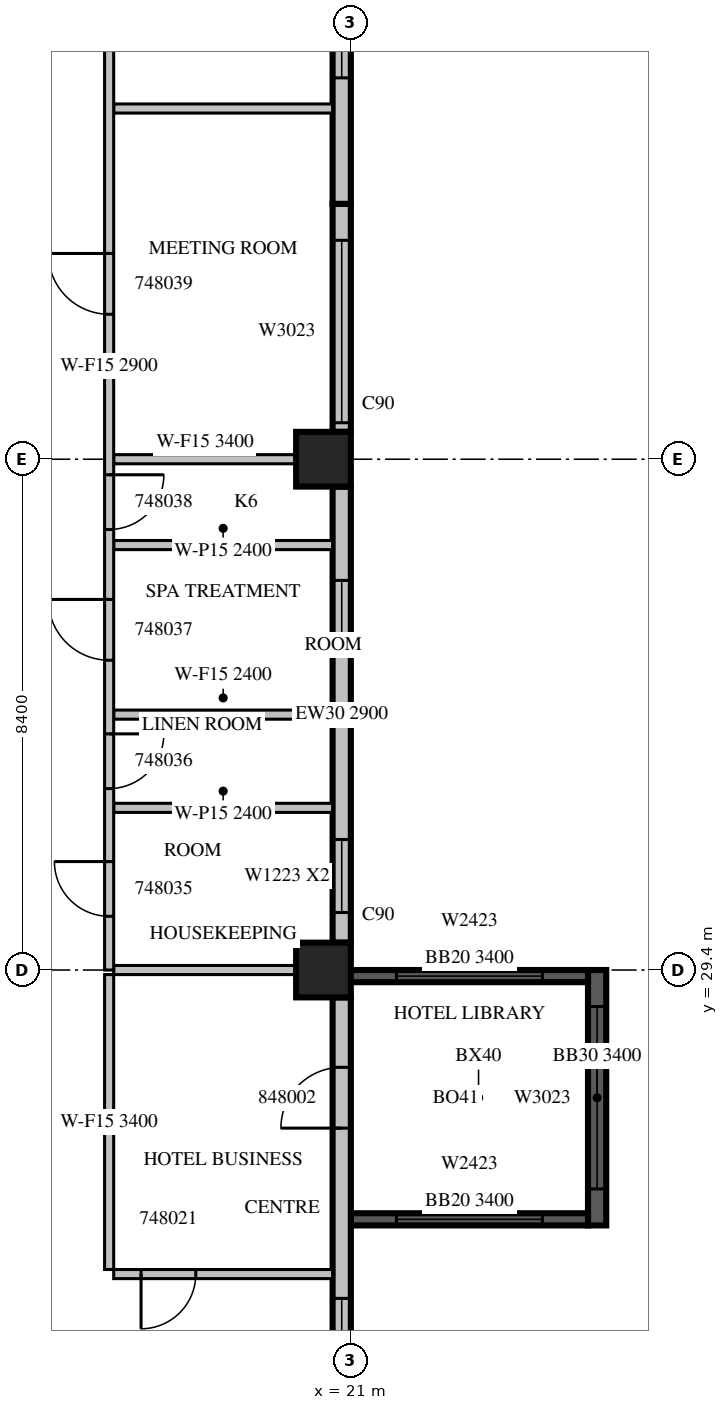
"""IFC4 building model, lengths in metres.
Left out: names, types, materials, properties, quantities, classifications, styles, units other than length and angle.
Written with IfcOpenShell. Run it as: python <this file> out.ifc"""

import sys

from ifc_helpers import new_model, si_unit, direction, frame, frame_2d, origin, origin_2d, place, context, subcontext, project, spatial, rectangle, extrude, source, transform, mapped, element, fill, save


model = new_model("IFC4")
c1 = context("Model", 3, precision=1e-05, world=origin(), true_north=direction((0.0, 1.0)))
c2 = subcontext(c1, "Body", "Model", "MODEL_VIEW")
j1 = project(units=[si_unit("LENGTHUNIT", "METRE"), si_unit("PLANEANGLEUNIT", "RADIAN")], contexts=[c1])
p1 = place(None, origin())
s1 = spatial("IfcSite", under=j1, at=p1, CompositionType="ELEMENT")
p2 = place(p1, origin())
s2 = spatial("IfcBuilding", under=s1, at=p2, CompositionType="ELEMENT")
p3 = place(p2, frame((0.0, 0.0, 215.8)))
s3 = spatial("IfcBuildingStorey", under=s2, at=p3, CompositionType="ELEMENT", Elevation=215.8)
m1 = source(origin(), c2, "Body", "SweptSolid", [
    extrude(rectangle(XDim=0.9, YDim=0.9, at=origin_2d()), origin(), (0.0, 0.0, 1.0), 3.8),
])
for number, where, z_axis, x_axis in (
    (1, (20.55, 29.4, 0.0), (0.0, 0.0, 1.0), (1.0, 0.0, 0.0)),
    (2, (20.55, 37.8, 0.0), (0.0, 0.0, 1.0), (1.0, 0.0, 0.0)),
):
    element("IfcColumn", number, at=place(p3, frame(where, z_axis=z_axis, x_axis=x_axis)), inside=s3, PredefinedType="COLUMN", context=c2, shape_type="MappedRepresentation", body=[
        mapped(m1, transform((0.0, 0.0, 0.0), scale=1.0)),
    ])
m2 = source(origin(), c2, "Body", "SweptSolid", [
    extrude(rectangle(XDim=4.2, YDim=0.3, at=frame_2d((2.1, 0.0))), origin(), (0.0, 0.0, 1.0), 3.4),
])
p4 = place(p3, frame((25.05, 25.2, 0.0), z_axis=(0.0, 0.0, 1.0), x_axis=(0.0, 1.0, 0.0)))
e3 = element("IfcWall", 3, at=p4, inside=s3, PredefinedType="SOLIDWALL", context=c2, shape_type="MappedRepresentation", body=[
    mapped(m2, transform((0.0, 0.0, 0.0), scale=1.0)),
])
m3 = source(origin(), c2, "Body", "SweptSolid", [
    extrude(rectangle(XDim=3.0, YDim=2.3, at=frame_2d((1.5, 1.15))), frame((0.0, 0.16, 0.0), z_axis=(0.0, -1.0, 0.0), x_axis=(1.0, 0.0, 0.0)), (0.0, 0.0, 1.0), 0.32),
])
p5 = place(p4, frame((0.6, 0.0, 0.6)))
e4 = element("IfcOpeningElement", 4, at=p5, cuts=e3, PredefinedType="OPENING", context=c2, shape_type="MappedRepresentation", body=[
    mapped(m3, transform((0.0, 0.0, 0.0), scale=1.0)),
])
m4 = source(origin(), c2, "Body", "SweptSolid", [
    extrude(rectangle(XDim=3.9, YDim=0.2, at=frame_2d((1.95, 0.0))), origin(), (0.0, 0.0, 1.0), 3.4),
])
p6 = place(p3, frame((21.0, 25.3, 0.0), z_axis=(0.0, 0.0, 1.0), x_axis=(1.0, 0.0, 0.0)))
e5 = element("IfcWall", 5, at=p6, inside=s3, PredefinedType="SOLIDWALL", context=c2, shape_type="MappedRepresentation", body=[
    mapped(m4, transform((0.0, 0.0, 0.0), scale=1.0)),
])
m5 = source(origin(), c2, "Body", "SweptSolid", [
    extrude(rectangle(XDim=2.4, YDim=2.3, at=frame_2d((1.2, 1.15))), frame((0.0, 0.11, 0.0), z_axis=(0.0, -1.0, 0.0), x_axis=(1.0, 0.0, 0.0)), (0.0, 0.0, 1.0), 0.22),
])
p7 = place(p6, frame((0.75, 0.0, 0.6)))
e6 = element("IfcOpeningElement", 6, at=p7, cuts=e5, PredefinedType="OPENING", context=c2, shape_type="MappedRepresentation", body=[
    mapped(m5, transform((0.0, 0.0, 0.0), scale=1.0)),
])
p8 = place(p3, frame((21.0, 29.3, 0.0), z_axis=(0.0, 0.0, 1.0), x_axis=(1.0, 0.0, 0.0)))
e7 = element("IfcWall", 7, at=p8, inside=s3, PredefinedType="SOLIDWALL", context=c2, shape_type="MappedRepresentation", body=[
    mapped(m4, transform((0.0, 0.0, 0.0), scale=1.0)),
])
p9 = place(p8, frame((0.75, 0.0, 0.6)))
e8 = element("IfcOpeningElement", 8, at=p9, cuts=e7, PredefinedType="OPENING", context=c2, shape_type="MappedRepresentation", body=[
    mapped(m5, transform((0.0, 0.0, 0.0), scale=1.0)),
])
m6 = source(origin(), c2, "Body", "SweptSolid", [
    extrude(rectangle(XDim=7.15, YDim=0.3, at=frame_2d((3.575, 0.0))), origin(), (0.0, 0.0, 1.0), 3.4),
])
p10 = place(p3, frame((20.85, 21.8, 0.0), z_axis=(0.0, 0.0, 1.0), x_axis=(0.0, 1.0, 0.0)))
e9 = element("IfcWall", 9, at=p10, inside=s3, PredefinedType="STANDARD", context=c2, shape_type="MappedRepresentation", body=[
    mapped(m6, transform((0.0, 0.0, 0.0), scale=1.0)),
])
m7 = source(origin(), c2, "Body", "SweptSolid", [
    extrude(rectangle(XDim=1.8, YDim=2.3, at=frame_2d((0.9, 1.15))), frame((0.0, 0.16, 0.0), z_axis=(0.0, -1.0, 0.0), x_axis=(1.0, 0.0, 0.0)), (0.0, 0.0, 1.0), 0.32),
])
p11 = place(p10, frame((0.4, 0.0, 0.6)))
e10 = element("IfcOpeningElement", 10, at=p11, cuts=e9, PredefinedType="OPENING", context=c2, shape_type="MappedRepresentation", body=[
    mapped(m7, transform((0.0, 0.0, 0.0), scale=1.0)),
])
m8 = source(origin(), c2, "Body", "SweptSolid", [
    extrude(rectangle(XDim=1.0, YDim=2.1, at=frame_2d((0.5, 1.05))), frame((0.0, 0.16, 0.0), z_axis=(0.0, -1.0, 0.0), x_axis=(1.0, 0.0, 0.0)), (0.0, 0.0, 1.0), 0.32),
])
p12 = place(p10, frame((5.0, 0.0, 0.0)))
e11 = element("IfcOpeningElement", 11, at=p12, cuts=e9, PredefinedType="OPENING", context=c2, shape_type="MappedRepresentation", body=[
    mapped(m8, transform((0.0, 0.0, 0.0), scale=1.0)),
])
m9 = source(origin(), c2, "Body", "SweptSolid", [
    extrude(rectangle(XDim=7.5, YDim=0.3, at=frame_2d((3.75, 0.0))), origin(), (0.0, 0.0, 1.0), 2.9),
])
p13 = place(p3, frame((20.85, 29.85, 0.0), z_axis=(0.0, 0.0, 1.0), x_axis=(0.0, 1.0, 0.0)))
e12 = element("IfcWall", 12, at=p13, inside=s3, PredefinedType="STANDARD", context=c2, shape_type="MappedRepresentation", body=[
    mapped(m9, transform((0.0, 0.0, 0.0), scale=1.0)),
])
m10 = source(origin(), c2, "Body", "SweptSolid", [
    extrude(rectangle(XDim=1.2, YDim=2.3, at=frame_2d((0.6, 1.15))), frame((0.0, 0.16, 0.0), z_axis=(0.0, -1.0, 0.0), x_axis=(1.0, 0.0, 0.0)), (0.0, 0.0, 1.0), 0.32),
])
p14 = place(p13, frame((0.496, 0.0, 0.6)))
e13 = element("IfcOpeningElement", 13, at=p14, cuts=e12, PredefinedType="OPENING", context=c2, shape_type="MappedRepresentation", body=[
    mapped(m10, transform((0.0, 0.0, 0.0), scale=1.0)),
])
p15 = place(p13, frame((4.757, 0.0, 0.6)))
e14 = element("IfcOpeningElement", 14, at=p15, cuts=e12, PredefinedType="OPENING", context=c2, shape_type="MappedRepresentation", body=[
    mapped(m10, transform((0.0, 0.0, 0.0), scale=1.0)),
])
m11 = source(origin(), c2, "Body", "SweptSolid", [
    extrude(rectangle(XDim=3.75, YDim=0.3, at=frame_2d((1.875, 0.0))), origin(), (0.0, 0.0, 1.0), 3.4),
])
p16 = place(p3, frame((20.85, 38.25, 0.0), z_axis=(0.0, 0.0, 1.0), x_axis=(0.0, 1.0, 0.0)))
e15 = element("IfcWall", 15, at=p16, inside=s3, PredefinedType="STANDARD", context=c2, shape_type="MappedRepresentation", body=[
    mapped(m11, transform((0.0, 0.0, 0.0), scale=1.0)),
])
p17 = place(p16, frame((0.15, 0.0, 0.6)))
e16 = element("IfcOpeningElement", 16, at=p17, cuts=e15, PredefinedType="OPENING", context=c2, shape_type="MappedRepresentation", body=[
    mapped(m3, transform((0.0, 0.0, 0.0), scale=1.0)),
])
p18 = place(p3, frame((20.85, 42.0, 0.0), z_axis=(0.0, 0.0, 1.0), x_axis=(0.0, 1.0, 0.0)))
e17 = element("IfcWall", 17, at=p18, inside=s3, PredefinedType="STANDARD", context=c2, shape_type="MappedRepresentation", body=[
    mapped(m11, transform((0.0, 0.0, 0.0), scale=1.0)),
])
p19 = place(p18, frame((2.071, 0.0, 0.6)))
e18 = element("IfcOpeningElement", 18, at=p19, cuts=e17, PredefinedType="OPENING", context=c2, shape_type="MappedRepresentation", body=[
    mapped(m10, transform((0.0, 0.0, 0.0), scale=1.0)),
])
m12 = source(origin(), c2, "Body", "SweptSolid", [
    extrude(rectangle(XDim=3.6, YDim=0.15, at=frame_2d((1.8, 0.0))), origin(), (0.0, 0.0, 1.0), 3.4),
])
p20 = place(p3, frame((17.1, 24.4, 0.0), z_axis=(0.0, 0.0, 1.0), x_axis=(1.0, 0.0, 0.0)))
e19 = element("IfcWall", 19, at=p20, inside=s3, PredefinedType="PARTITIONING", context=c2, shape_type="MappedRepresentation", body=[
    mapped(m12, transform((0.0, 0.0, 0.0), scale=1.0)),
])
m13 = source(origin(), c2, "Body", "SweptSolid", [
    extrude(rectangle(XDim=0.9, YDim=2.1, at=frame_2d((0.45, 1.05))), frame((0.0, 0.085, 0.0), z_axis=(0.0, -1.0, 0.0), x_axis=(1.0, 0.0, 0.0)), (0.0, 0.0, 1.0), 0.17),
])
p21 = place(p20, frame((0.45, 0.0, 0.0)))
e20 = element("IfcOpeningElement", 20, at=p21, cuts=e19, PredefinedType="OPENING", context=c2, shape_type="MappedRepresentation", body=[
    mapped(m13, transform((0.0, 0.0, 0.0), scale=1.0)),
])
m14 = source(origin(), c2, "Body", "SweptSolid", [
    extrude(rectangle(XDim=4.85, YDim=0.15, at=frame_2d((2.425, 0.0))), origin(), (0.0, 0.0, 1.0), 3.4),
])
p22 = place(p3, frame((17.025, 29.325, 0.0), z_axis=(0.0, 0.0, 1.0), x_axis=(0.0, -1.0, 0.0)))
e21 = element("IfcWall", 21, at=p22, inside=s3, PredefinedType="PARTITIONING", context=c2, shape_type="MappedRepresentation", body=[
    mapped(m14, transform((0.0, 0.0, 0.0), scale=1.0)),
])
m15 = source(origin(), c2, "Body", "SweptSolid", [
    extrude(rectangle(XDim=3.001, YDim=0.15, at=frame_2d((1.5, 0.0))), origin(), (0.0, 0.0, 1.0), 3.4),
])
p23 = place(p3, frame((20.101, 29.4, 0.0), z_axis=(0.0, 0.0, 1.0), x_axis=(-1.0, 0.0, 0.0)))
e22 = element("IfcWall", 22, at=p23, inside=s3, PredefinedType="PARTITIONING", context=c2, shape_type="MappedRepresentation", body=[
    mapped(m15, transform((0.0, 0.0, 0.0), scale=1.0)),
])
m16 = source(origin(), c2, "Body", "SweptSolid", [
    extrude(rectangle(XDim=3.6, YDim=0.15, at=frame_2d((1.8, 0.0))), origin(), (0.0, 0.0, 1.0), 2.4),
])
for number, where, z_axis, x_axis in (
    (23, (17.1, 32.067, 0.0), (0.0, 0.0, 1.0), (1.0, 0.0, 0.0)),
    (24, (17.1, 36.389, 0.0), (0.0, 0.0, 1.0), (1.0, 0.0, 0.0)),
):
    element("IfcWall", number, at=place(p3, frame(where, z_axis=z_axis, x_axis=x_axis)), inside=s3, PredefinedType="PARTITIONING", context=c2, shape_type="MappedRepresentation", body=[
        mapped(m16, transform((0.0, 0.0, 0.0), scale=1.0)),
    ])
p24 = place(p3, frame((17.1, 43.568, 0.0), z_axis=(0.0, 0.0, 1.0), x_axis=(1.0, 0.0, 0.0)))
e25 = element("IfcWall", 25, at=p24, inside=s3, PredefinedType="PARTITIONING", context=c2, shape_type="MappedRepresentation", body=[
    mapped(m12, transform((0.0, 0.0, 0.0), scale=1.0)),
])
p25 = place(p3, frame((20.7, 33.6, 0.0), z_axis=(0.0, 0.0, 1.0), x_axis=(-1.0, 0.0, 0.0)))
e26 = element("IfcWall", 26, at=p25, inside=s3, PredefinedType="PARTITIONING", context=c2, shape_type="MappedRepresentation", body=[
    mapped(m16, transform((0.0, 0.0, 0.0), scale=1.0)),
])
p26 = place(p3, frame((20.101, 37.8, 0.0), z_axis=(0.0, 0.0, 1.0), x_axis=(-1.0, 0.0, 0.0)))
e27 = element("IfcWall", 27, at=p26, inside=s3, PredefinedType="PARTITIONING", context=c2, shape_type="MappedRepresentation", body=[
    mapped(m15, transform((0.0, 0.0, 0.0), scale=1.0)),
])
m17 = source(origin(), c2, "Body", "SweptSolid", [
    extrude(rectangle(XDim=19.86, YDim=0.15, at=frame_2d((9.93, 0.0))), origin(), (0.0, 0.0, 1.0), 2.9),
])
p27 = place(p3, frame((17.025, 49.26, 0.0), z_axis=(0.0, 0.0, 1.0), x_axis=(0.0, -1.0, 0.0)))
e28 = element("IfcWall", 28, at=p27, inside=s3, PredefinedType="PARTITIONING", context=c2, shape_type="MappedRepresentation", body=[
    mapped(m17, transform((0.0, 0.0, 0.0), scale=1.0)),
])
p28 = place(p27, frame((18.076, 0.0, 0.0)))
e29 = element("IfcOpeningElement", 29, at=p28, cuts=e28, PredefinedType="OPENING", context=c2, shape_type="MappedRepresentation", body=[
    mapped(m13, transform((0.0, 0.0, 0.0), scale=1.0)),
])
p29 = place(p27, frame((15.976, 0.0, 0.0)))
e30 = element("IfcOpeningElement", 30, at=p29, cuts=e28, PredefinedType="OPENING", context=c2, shape_type="MappedRepresentation", body=[
    mapped(m13, transform((0.0, 0.0, 0.0), scale=1.0)),
])
m18 = source(origin(), c2, "Body", "SweptSolid", [
    extrude(rectangle(XDim=1.0, YDim=2.1, at=frame_2d((0.5, 1.05))), frame((0.0, 0.085, 0.0), z_axis=(0.0, -1.0, 0.0), x_axis=(1.0, 0.0, 0.0)), (0.0, 0.0, 1.0), 0.17),
])
p30 = place(p27, frame((13.766, 0.0, 0.0)))
e31 = element("IfcOpeningElement", 31, at=p30, cuts=e28, PredefinedType="OPENING", context=c2, shape_type="MappedRepresentation", body=[
    mapped(m18, transform((0.0, 0.0, 0.0), scale=1.0)),
])
p31 = place(p27, frame((11.716, 0.0, 0.0)))
e32 = element("IfcOpeningElement", 32, at=p31, cuts=e28, PredefinedType="OPENING", context=c2, shape_type="MappedRepresentation", body=[
    mapped(m13, transform((0.0, 0.0, 0.0), scale=1.0)),
])
p32 = place(p27, frame((8.076, 0.0, 0.0)))
e33 = element("IfcOpeningElement", 33, at=p32, cuts=e28, PredefinedType="OPENING", context=c2, shape_type="MappedRepresentation", body=[
    mapped(m18, transform((0.0, 0.0, 0.0), scale=1.0)),
])
p33 = place(p27, frame((2.309, 0.0, 0.0)))
e34 = element("IfcOpeningElement", 34, at=p33, cuts=e28, PredefinedType="OPENING", context=c2, shape_type="MappedRepresentation", body=[
    mapped(m18, transform((0.0, 0.0, 0.0), scale=1.0)),
])
m19 = source(origin(), c2, "Body", "SweptSolid", [
    extrude(rectangle(XDim=3.0, YDim=2.3, at=frame_2d((1.5, 1.15))), frame((0.0, 0.03, 0.0), z_axis=(0.0, -1.0, 0.0), x_axis=(1.0, 0.0, 0.0)), (0.0, 0.0, 1.0), 0.06),
])
p34 = place(p5, origin())
e35 = element("IfcWindow", 35, at=p34, inside=s3, PartitioningType="SINGLE_PANEL", PredefinedType="WINDOW", context=c2, shape_type="MappedRepresentation", body=[
    mapped(m19, transform((0.0, 0.0, 0.0), scale=1.0)),
])
fill(e4, e35)
m20 = source(origin(), c2, "Body", "SweptSolid", [
    extrude(rectangle(XDim=2.4, YDim=2.3, at=frame_2d((1.2, 1.15))), frame((0.0, 0.03, 0.0), z_axis=(0.0, -1.0, 0.0), x_axis=(1.0, 0.0, 0.0)), (0.0, 0.0, 1.0), 0.06),
])
p35 = place(p7, origin())
e36 = element("IfcWindow", 36, at=p35, inside=s3, PartitioningType="SINGLE_PANEL", PredefinedType="WINDOW", context=c2, shape_type="MappedRepresentation", body=[
    mapped(m20, transform((0.0, 0.0, 0.0), scale=1.0)),
])
fill(e6, e36)
p36 = place(p9, origin())
e37 = element("IfcWindow", 37, at=p36, inside=s3, PartitioningType="SINGLE_PANEL", PredefinedType="WINDOW", context=c2, shape_type="MappedRepresentation", body=[
    mapped(m20, transform((0.0, 0.0, 0.0), scale=1.0)),
])
fill(e8, e37)
m21 = source(origin(), c2, "Body", "SweptSolid", [
    extrude(rectangle(XDim=1.8, YDim=2.3, at=frame_2d((0.9, 1.15))), frame((0.0, 0.03, 0.0), z_axis=(0.0, -1.0, 0.0), x_axis=(1.0, 0.0, 0.0)), (0.0, 0.0, 1.0), 0.06),
])
p37 = place(p11, origin())
e38 = element("IfcWindow", 38, at=p37, inside=s3, PartitioningType="SINGLE_PANEL", PredefinedType="WINDOW", context=c2, shape_type="MappedRepresentation", body=[
    mapped(m21, transform((0.0, 0.0, 0.0), scale=1.0)),
])
fill(e10, e38)
m22 = source(origin(), c2, "Body", "SweptSolid", [
    extrude(rectangle(XDim=1.2, YDim=2.3, at=frame_2d((0.6, 1.15))), frame((0.0, 0.03, 0.0), z_axis=(0.0, -1.0, 0.0), x_axis=(1.0, 0.0, 0.0)), (0.0, 0.0, 1.0), 0.06),
])
p38 = place(p14, origin())
e39 = element("IfcWindow", 39, at=p38, inside=s3, PartitioningType="SINGLE_PANEL", PredefinedType="WINDOW", context=c2, shape_type="MappedRepresentation", body=[
    mapped(m22, transform((0.0, 0.0, 0.0), scale=1.0)),
])
fill(e13, e39)
p39 = place(p15, origin())
e40 = element("IfcWindow", 40, at=p39, inside=s3, PartitioningType="SINGLE_PANEL", PredefinedType="WINDOW", context=c2, shape_type="MappedRepresentation", body=[
    mapped(m22, transform((0.0, 0.0, 0.0), scale=1.0)),
])
fill(e14, e40)
p40 = place(p17, origin())
e41 = element("IfcWindow", 41, at=p40, inside=s3, PartitioningType="SINGLE_PANEL", PredefinedType="WINDOW", context=c2, shape_type="MappedRepresentation", body=[
    mapped(m19, transform((0.0, 0.0, 0.0), scale=1.0)),
])
fill(e16, e41)
p41 = place(p19, origin())
e42 = element("IfcWindow", 42, at=p41, inside=s3, PartitioningType="SINGLE_PANEL", PredefinedType="WINDOW", context=c2, shape_type="MappedRepresentation", body=[
    mapped(m22, transform((0.0, 0.0, 0.0), scale=1.0)),
])
fill(e18, e42)
m23 = source(origin(), c2, "Body", "SweptSolid", [
    extrude(rectangle(XDim=0.9, YDim=2.1, at=frame_2d((0.45, 1.05))), frame((0.0, 0.025, 0.0), z_axis=(0.0, -1.0, 0.0), x_axis=(1.0, 0.0, 0.0)), (0.0, 0.0, 1.0), 0.05),
])
p42 = place(p21, origin())
e43 = element("IfcDoor", 43, at=p42, inside=s3, OperationType="SINGLE_SWING_RIGHT", PredefinedType="DOOR", context=c2, shape_type="MappedRepresentation", body=[
    mapped(m23, transform((0.0, 0.0, 0.0), scale=1.0)),
])
fill(e20, e43)
p43 = place(p28, origin())
e44 = element("IfcDoor", 44, at=p43, inside=s3, OperationType="SINGLE_SWING_RIGHT", PredefinedType="DOOR", context=c2, shape_type="MappedRepresentation", body=[
    mapped(m23, transform((0.0, 0.0, 0.0), scale=1.0)),
])
fill(e29, e44)
p44 = place(p29, origin())
e45 = element("IfcDoor", 45, at=p44, inside=s3, OperationType="SINGLE_SWING_LEFT", PredefinedType="DOOR", context=c2, shape_type="MappedRepresentation", body=[
    mapped(m23, transform((0.0, 0.0, 0.0), scale=1.0)),
])
fill(e30, e45)
m24 = source(origin(), c2, "Body", "SweptSolid", [
    extrude(rectangle(XDim=1.0, YDim=2.1, at=frame_2d((0.5, 1.05))), frame((0.0, 0.025, 0.0), z_axis=(0.0, -1.0, 0.0), x_axis=(1.0, 0.0, 0.0)), (0.0, 0.0, 1.0), 0.05),
])
p45 = place(p30, origin())
e46 = element("IfcDoor", 46, at=p45, inside=s3, OperationType="SINGLE_SWING_RIGHT", PredefinedType="DOOR", context=c2, shape_type="MappedRepresentation", body=[
    mapped(m24, transform((0.0, 0.0, 0.0), scale=1.0)),
])
fill(e31, e46)
p46 = place(p31, origin())
e47 = element("IfcDoor", 47, at=p46, inside=s3, OperationType="SINGLE_SWING_LEFT", PredefinedType="DOOR", context=c2, shape_type="MappedRepresentation", body=[
    mapped(m23, transform((0.0, 0.0, 0.0), scale=1.0)),
])
fill(e32, e47)
p47 = place(p32, origin())
e48 = element("IfcDoor", 48, at=p47, inside=s3, OperationType="SINGLE_SWING_RIGHT", PredefinedType="DOOR", context=c2, shape_type="MappedRepresentation", body=[
    mapped(m24, transform((0.0, 0.0, 0.0), scale=1.0)),
])
fill(e33, e48)
p48 = place(p12, origin())
e49 = element("IfcDoor", 49, at=p48, inside=s3, OperationType="SINGLE_SWING_LEFT", PredefinedType="DOOR", context=c2, shape_type="MappedRepresentation", body=[
    mapped(m24, transform((0.0, 0.0, 0.0), scale=1.0)),
])
fill(e11, e49)
save(model, sys.argv[1])
